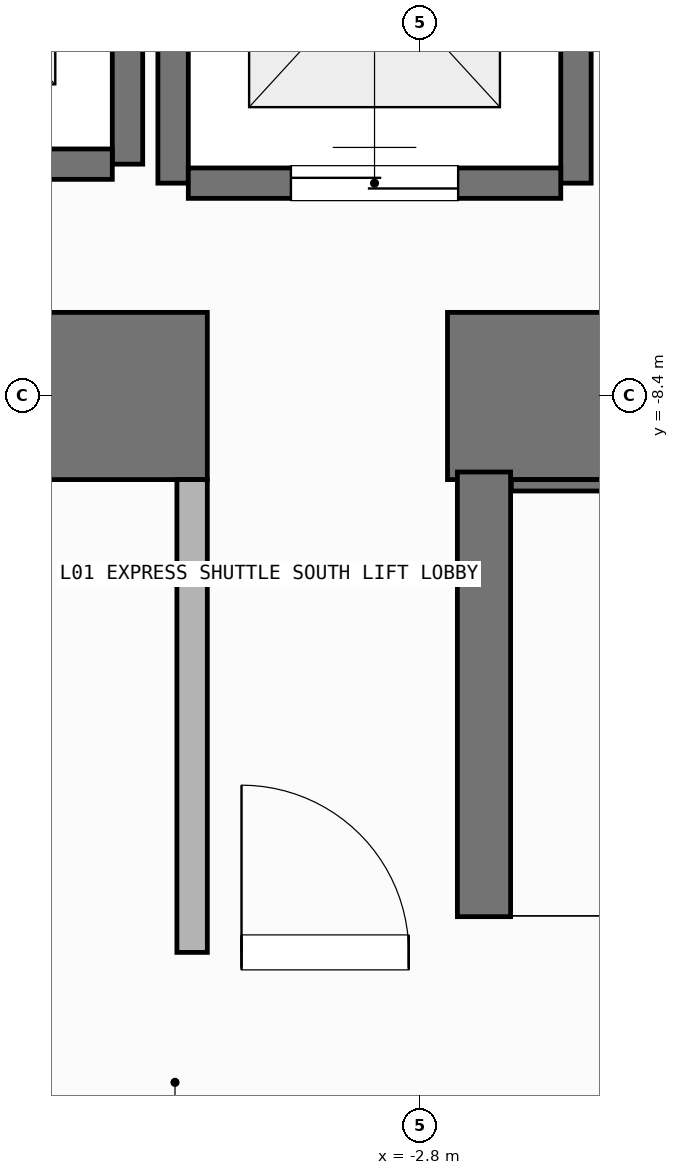
"""IFC4 building model, lengths in metres.
Left out: names, types, materials, properties, quantities, classifications, styles, units other than length and angle.
Written with IfcOpenShell. Run it as: python <this file> out.ifc"""

import sys

from ifc_helpers import new_model, si_unit, direction, frame, frame_2d, origin, place, context, subcontext, project, spatial, rectangle, extrude, element, fill, save


model = new_model("IFC4")
c1 = context("Model", 3, precision=1e-05, world=origin(), true_north=direction((0.0, 1.0)))
c2 = subcontext(c1, "Body", "Model", "MODEL_VIEW")
j1 = project(units=[si_unit("LENGTHUNIT", "METRE"), si_unit("PLANEANGLEUNIT", "RADIAN")], contexts=[c1])
p1 = place(None, origin())
s1 = spatial("IfcSite", under=j1, at=p1, CompositionType="ELEMENT")
p2 = place(p1, origin())
s2 = spatial("IfcBuilding", under=s1, at=p2, CompositionType="ELEMENT")
p3 = place(p2, origin())
s3 = spatial("IfcBuildingStorey", under=s2, at=p3, CompositionType="ELEMENT", Elevation=0.0)
p4 = place(p3, frame((-7.55, -8.4, 0.0), z_axis=(0.0, 0.0, 1.0), x_axis=(1.0, 0.0, 0.0)))
e1 = element("IfcWall", 1, at=p4, inside=s3, PredefinedType="SHEAR", context=c2, shape_type="SweptSolid", body=[
    extrude(rectangle(XDim=3.35, YDim=1.1, at=frame_2d((1.675, 0.0))), origin(), (0.0, 0.0, 1.0), 4.8),
])
p5 = place(p3, frame((-2.62, -8.4, 0.0), z_axis=(0.0, 0.0, 1.0), x_axis=(1.0, 0.0, 0.0)))
e2 = element("IfcWall", 2, at=p5, inside=s3, PredefinedType="SHEAR", context=c2, shape_type="SweptSolid", body=[
    extrude(rectangle(XDim=7.27, YDim=1.1, at=frame_2d((3.635, 0.0))), origin(), (0.0, 0.0, 1.0), 4.8),
])
p6 = place(p3, frame((-2.555, -12.0, 0.0), z_axis=(0.0, 0.0, 1.0), x_axis=(1.0, 0.0, 0.0)))
e3 = element("IfcWall", 3, at=p6, inside=s3, PredefinedType="SHEAR", context=c2, shape_type="SweptSolid", body=[
    extrude(rectangle(XDim=7.31, YDim=0.35, at=frame_2d((3.655, 0.0))), origin(), (0.0, 0.0, 1.0), 4.8),
])
p7 = place(p3, frame((-2.2, -8.988, 0.0), z_axis=(0.0, 0.0, 1.0), x_axis=(1.0, 0.0, 0.0)))
e4 = element("IfcWall", 4, at=p7, inside=s3, PredefinedType="SHEAR", context=c2, shape_type="SweptSolid", body=[
    extrude(rectangle(XDim=6.6, YDim=0.075, at=frame_2d((3.3, 0.0))), origin(), (0.0, 0.0, 1.0), 4.8),
])
p8 = place(p3, frame((-2.38, -11.825, 0.0), z_axis=(0.0, 0.0, 1.0), x_axis=(0.0, 1.0, 0.0)))
e5 = element("IfcWall", 5, at=p8, inside=s3, PredefinedType="SHEAR", context=c2, shape_type="SweptSolid", body=[
    extrude(rectangle(XDim=2.925, YDim=0.35, at=frame_2d((1.462, 0.0))), origin(), (0.0, 0.0, 1.0), 4.8),
])
p9 = place(p3, frame((-4.725, -6.875, 0.0), z_axis=(0.0, 0.0, 1.0), x_axis=(0.0, 1.0, 0.0)))
e6 = element("IfcWall", 6, at=p9, inside=s3, PredefinedType="SHEAR", context=c2, shape_type="SweptSolid", body=[
    extrude(rectangle(XDim=2.55, YDim=0.2, at=frame_2d((1.275, 0.0))), origin(), (0.0, 0.0, 1.0), 4.56),
])
p10 = place(p3, frame((-7.175, -6.875, 0.0), z_axis=(0.0, 0.0, 1.0), x_axis=(1.0, 0.0, 0.0)))
e7 = element("IfcWall", 7, at=p10, inside=s3, PredefinedType="SHEAR", context=c2, shape_type="SweptSolid", body=[
    extrude(rectangle(XDim=2.35, YDim=0.2, at=frame_2d((1.175, 0.0))), origin(), (0.0, 0.0, 1.0), 4.56),
])
for number, where, z_axis, x_axis in (
    (8, (-4.425, -7.0, 0.0), (0.0, 0.0, 1.0), (0.0, 1.0, 0.0)),
    (9, (-1.775, -7.0, 0.0), (0.0, 0.0, 1.0), (0.0, 1.0, 0.0)),
):
    element("IfcWall", number, at=place(p3, frame(where, z_axis=z_axis, x_axis=x_axis)), inside=s3, PredefinedType="SHEAR", context=c2, shape_type="SweptSolid", body=[
        extrude(rectangle(XDim=2.8, YDim=0.2, at=frame_2d((1.4, 0.0))), origin(), (0.0, 0.0, 1.0), 4.56),
    ])
p11 = place(p3, frame((-4.325, -7.0, 0.0), z_axis=(0.0, 0.0, 1.0), x_axis=(1.0, 0.0, 0.0)))
e10 = element("IfcWall", 10, at=p11, inside=s3, PredefinedType="SHEAR", context=c2, shape_type="SweptSolid", body=[
    extrude(rectangle(XDim=2.45, YDim=0.2, at=frame_2d((1.225, 0.0))), origin(), (0.0, 0.0, 1.0), 4.56),
])
p12 = place(p11, frame((0.675, 0.0, 0.0)))
e11 = element("IfcOpeningElement", 11, at=p12, cuts=e10, PredefinedType="OPENING", context=c2, shape_type="SweptSolid", body=[
    extrude(rectangle(XDim=1.1, YDim=2.2, at=frame_2d((0.55, 1.1))), frame((0.0, 0.11, 0.0), z_axis=(0.0, -1.0, 0.0), x_axis=(1.0, 0.0, 0.0)), (0.0, 0.0, 1.0), 0.22),
])
p13 = place(p3, frame((-4.3, -12.06, 0.0), z_axis=(0.0, 0.0, 1.0), x_axis=(1.0, 0.0, 0.0)))
e12 = element("IfcWall", 12, at=p13, inside=s3, PredefinedType="SOLIDWALL", context=c2, shape_type="SweptSolid", body=[
    extrude(rectangle(XDim=1.75, YDim=0.2, at=frame_2d((0.875, 0.0))), origin(), (0.0, 0.0, 1.0), 4.56),
])
p14 = place(p13, frame((0.325, 0.0, 0.0)))
e13 = element("IfcOpeningElement", 13, at=p14, cuts=e12, PredefinedType="OPENING", context=c2, shape_type="SweptSolid", body=[
    extrude(rectangle(XDim=1.1, YDim=2.15, at=frame_2d((0.55, 1.075))), frame((0.0, 0.11, 0.0), z_axis=(0.0, -1.0, 0.0), x_axis=(1.0, 0.0, 0.0)), (0.0, 0.0, 1.0), 0.22),
])
p15 = place(p3, frame((-4.3, -12.06, 0.0), z_axis=(0.0, 0.0, 1.0), x_axis=(0.0, 1.0, 0.0)))
e14 = element("IfcWall", 14, at=p15, inside=s3, PredefinedType="SOLIDWALL", context=c2, shape_type="SweptSolid", body=[
    extrude(rectangle(XDim=3.11, YDim=0.2, at=frame_2d((1.555, 0.0))), origin(), (0.0, 0.0, 1.0), 4.56),
])
p16 = place(p12, origin())
e15 = element("IfcDoor", 15, at=p16, inside=s3, OperationType="SLIDING_TO_LEFT", PredefinedType="DOOR", context=c2, shape_type="SweptSolid", body=[
    extrude(rectangle(XDim=1.1, YDim=2.2, at=frame_2d((0.55, 1.1))), frame((0.0, 0.025, 0.0), z_axis=(0.0, -1.0, 0.0), x_axis=(1.0, 0.0, 0.0)), (0.0, 0.0, 1.0), 0.05),
])
fill(e11, e15)
p17 = place(p14, origin())
e16 = element("IfcDoor", 16, at=p17, inside=s3, OperationType="SINGLE_SWING_LEFT", PredefinedType="DOOR", context=c2, shape_type="SweptSolid", body=[
    extrude(rectangle(XDim=1.1, YDim=2.15, at=frame_2d((0.55, 1.075))), frame((0.0, 0.025, 0.0), z_axis=(0.0, -1.0, 0.0), x_axis=(1.0, 0.0, 0.0)), (0.0, 0.0, 1.0), 0.05),
])
fill(e13, e16)
save(model, sys.argv[1])
